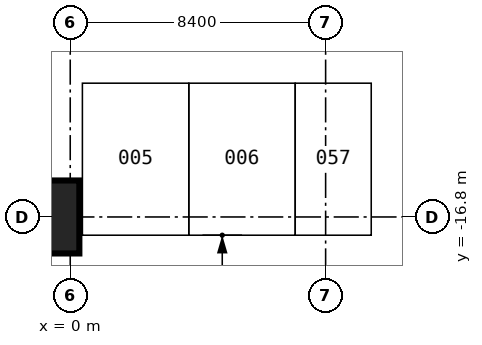
"""IFC4 building model, lengths in metres.
Left out: names, types, materials, properties, quantities, classifications, styles, units other than length and angle.
Written with IfcOpenShell. Run it as: python <this file> out.ifc"""

import sys

from ifc_helpers import new_model, si_unit, direction, frame, origin, origin_2d, place, context, subcontext, project, spatial, rectangle, extrude, element, save


model = new_model("IFC4")
c1 = context("Model", 3, precision=1e-05, world=origin(), true_north=direction((0.0, 1.0)))
c2 = subcontext(c1, "Body", "Model", "MODEL_VIEW")
j1 = project(units=[si_unit("LENGTHUNIT", "METRE"), si_unit("PLANEANGLEUNIT", "RADIAN")], contexts=[c1])
p1 = place(None, origin())
s1 = spatial("IfcSite", under=j1, at=p1, CompositionType="ELEMENT")
p2 = place(p1, origin())
s2 = spatial("IfcBuilding", under=s1, at=p2, CompositionType="ELEMENT")
p3 = place(p2, frame((0.0, 0.0, -13.5)))
s3 = spatial("IfcBuildingStorey", under=s2, at=p3, CompositionType="ELEMENT", Elevation=-13.5)
p4 = place(p3, frame((-0.9, -16.8, 0.0), z_axis=(0.0, 0.0, 1.0), x_axis=(1.0, 0.0, 0.0)))
e1 = element("IfcColumn", 1, at=p4, inside=s3, PredefinedType="COLUMN", context=c2, shape_type="SweptSolid", body=[
    extrude(rectangle(XDim=2.4, YDim=2.4, at=origin_2d()), origin(), (0.0, 0.0, 1.0), 4.5),
])
save(model, sys.argv[1])
